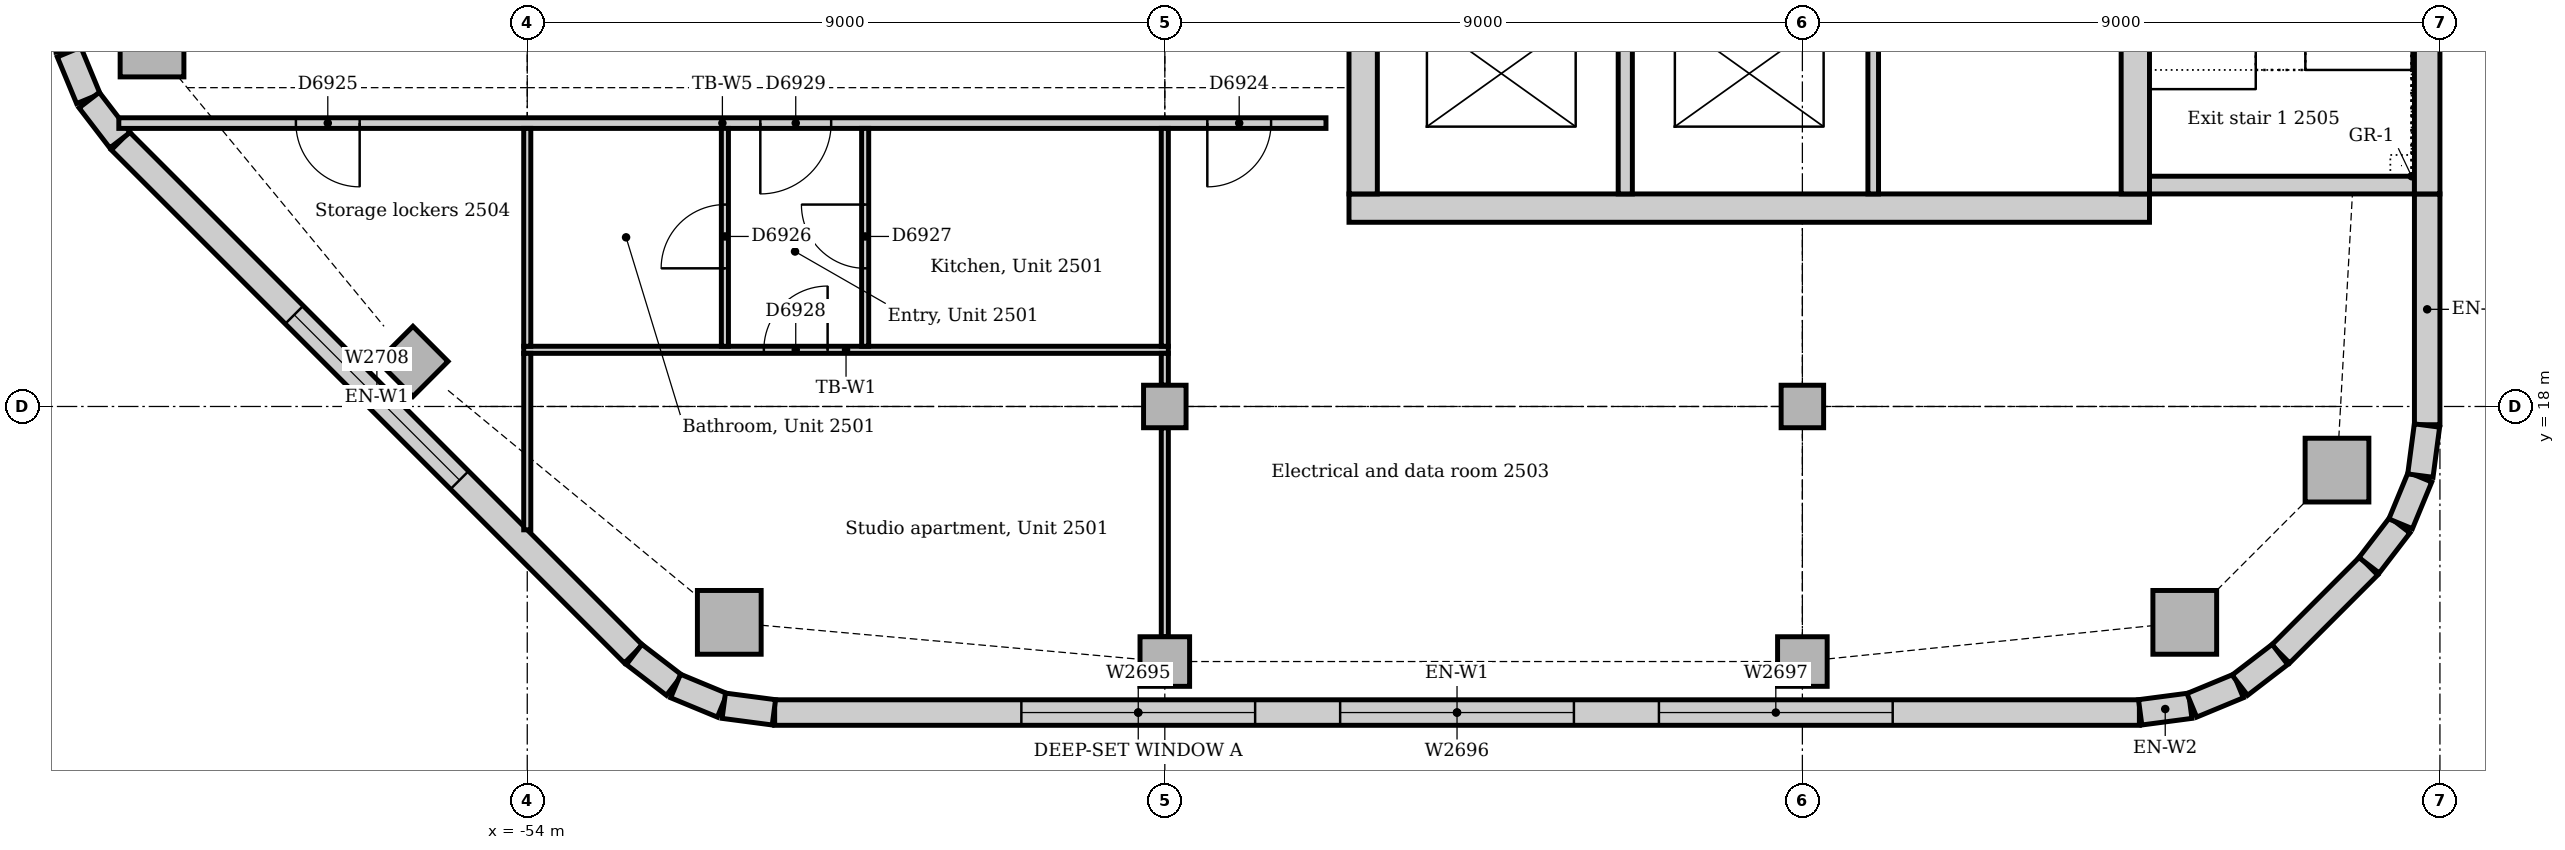
"""IFC4 building model, lengths in metres.
Left out: names, types, materials, properties, quantities, classifications, styles, units other than length and angle.
Written with IfcOpenShell. Run it as: python <this file> out.ifc"""

import sys

from ifc_helpers import new_model, si_unit, direction, frame, frame_2d, origin, origin_2d, place, context, subcontext, project, spatial, rectangle, extrude, element, fill, save


model = new_model("IFC4")
c1 = context("Model", 3, precision=1e-05, world=origin(), true_north=direction((0.0, 1.0)))
c2 = subcontext(c1, "Body", "Model", "MODEL_VIEW")
j1 = project(units=[si_unit("LENGTHUNIT", "METRE"), si_unit("PLANEANGLEUNIT", "RADIAN")], contexts=[c1])
p1 = place(None, origin())
s1 = spatial("IfcSite", under=j1, at=p1, CompositionType="ELEMENT")
p2 = place(p1, origin())
s2 = spatial("IfcBuilding", under=s1, at=p2, CompositionType="ELEMENT")
p3 = place(p2, frame((0.0, 0.0, 108.0)))
s3 = spatial("IfcBuildingStorey", under=s2, at=p3, CompositionType="ELEMENT", Elevation=108.0)
p4 = place(p3, frame((-42.4, 20.8, 0.0), z_axis=(0.0, 0.0, 1.0), x_axis=(1.0, 0.0, 0.0)))
e1 = element("IfcWall", 1, at=p4, inside=s3, PredefinedType="SOLIDWALL", context=c2, shape_type="SweptSolid", body=[
    extrude(rectangle(XDim=11.3, YDim=0.4, at=frame_2d((5.65, 0.0))), origin(), (0.0, 0.0, 1.0), 4.0),
])
p5 = place(p3, frame((-31.3, 21.0, 0.0), z_axis=(0.0, 0.0, 1.0), x_axis=(0.0, 1.0, 0.0)))
e2 = element("IfcWall", 2, at=p5, inside=s3, PredefinedType="SOLIDWALL", context=c2, shape_type="SweptSolid", body=[
    extrude(rectangle(XDim=9.5, YDim=0.4, at=frame_2d((4.75, 0.0))), origin(), (0.0, 0.0, 1.0), 4.0),
])
p6 = place(p5, frame((5.25, 0.0, 0.0)))
e3 = element("IfcOpeningElement", 3, at=p6, cuts=e2, PredefinedType="OPENING", context=c2, shape_type="SweptSolid", body=[
    extrude(rectangle(XDim=1.0, YDim=2.1, at=frame_2d((0.5, 1.05))), frame((0.0, 0.21, 0.0), z_axis=(0.0, -1.0, 0.0), x_axis=(1.0, 0.0, 0.0)), (0.0, 0.0, 1.0), 0.42),
])
p7 = place(p3, frame((-42.2, 30.5, 0.0), z_axis=(0.0, 0.0, 1.0), x_axis=(0.0, -1.0, 0.0)))
e4 = element("IfcWall", 4, at=p7, inside=s3, PredefinedType="SOLIDWALL", context=c2, shape_type="SweptSolid", body=[
    extrude(rectangle(XDim=9.5, YDim=0.4, at=frame_2d((4.75, 0.0))), origin(), (0.0, 0.0, 1.0), 4.0),
])
p8 = place(p7, frame((3.85, 0.0, 0.0)))
e5 = element("IfcOpeningElement", 5, at=p8, cuts=e4, PredefinedType="OPENING", context=c2, shape_type="SweptSolid", body=[
    extrude(rectangle(XDim=1.8, YDim=2.1, at=frame_2d((0.9, 1.05))), frame((0.0, 0.21, 0.0), z_axis=(0.0, -1.0, 0.0), x_axis=(1.0, 0.0, 0.0)), (0.0, 0.0, 1.0), 0.42),
])
p9 = place(p3, frame((-31.1, 21.125, 0.0), z_axis=(0.0, 0.0, 1.0), x_axis=(1.0, 0.0, 0.0)))
e6 = element("IfcWall", 6, at=p9, inside=s3, PredefinedType="SOLIDWALL", context=c2, shape_type="SweptSolid", body=[
    extrude(rectangle(XDim=3.74, YDim=0.25, at=frame_2d((1.87, 0.0))), origin(), (0.0, 0.0, 1.0), 4.0),
])
for number, where, z_axis, x_axis in (
    (7, (-51.148, 14.953, 0.0), (0.0, 0.0, 1.0), (1.0, 0.0, 0.0)),
    (8, (-30.602, 14.953, 0.0), (0.0, 0.0, 1.0), (1.0, 0.0, 0.0)),
    (9, (-28.453, 17.102, 0.0), (0.0, 0.0, 1.0), (1.0, 0.0, 0.0)),
    (10, (-59.297, 23.102, 0.0), (0.0, 0.0, 1.0), (1.0, 0.0, 0.0)),
):
    element("IfcColumn", number, at=place(p3, frame(where, z_axis=z_axis, x_axis=x_axis)), inside=s3, PredefinedType="COLUMN", context=c2, shape_type="SweptSolid", body=[
        extrude(rectangle(XDim=0.9, YDim=0.9, at=origin_2d()), origin(), (0.0, 0.0, 1.0), 3.85),
    ])
for number, where, z_axis, x_axis in (
    (11, (-45.0, 14.4, 0.0), (0.0, 0.0, 1.0), (1.0, 0.0, 0.0)),
    (12, (-36.0, 14.4, 0.0), (0.0, 0.0, 1.0), (1.0, 0.0, 0.0)),
    (13, (-55.614, 18.636, 0.0), (0.0, 0.0, 1.0), (0.707, 0.707, 0.0)),
):
    element("IfcColumn", number, at=place(p3, frame(where, z_axis=z_axis, x_axis=x_axis)), inside=s3, PredefinedType="COLUMN", context=c2, shape_type="SweptSolid", body=[
        extrude(rectangle(XDim=0.7, YDim=0.7, at=origin_2d()), origin(), (0.0, 0.0, 1.0), 3.85),
    ])
for number, where, z_axis, x_axis in (
    (14, (-45.0, 18.0, 0.0), (0.0, 0.0, 1.0), (1.0, 0.0, 0.0)),
    (15, (-36.0, 18.0, 0.0), (0.0, 0.0, 1.0), (1.0, 0.0, 0.0)),
):
    element("IfcColumn", number, at=place(p3, frame(where, z_axis=z_axis, x_axis=x_axis)), inside=s3, PredefinedType="COLUMN", context=c2, shape_type="SweptSolid", body=[
        extrude(rectangle(XDim=0.6, YDim=0.6, at=origin_2d()), origin(), (0.0, 0.0, 1.0), 3.85),
    ])
p10 = place(p3, frame((-50.507, 13.68, 0.0), z_axis=(0.0, 0.0, 1.0), x_axis=(1.0, 0.0, 0.0)))
e16 = element("IfcWall", 16, at=p10, inside=s3, PredefinedType="STANDARD", context=c2, shape_type="SweptSolid", body=[
    extrude(rectangle(XDim=19.265, YDim=0.36, at=frame_2d((9.632, 0.0))), origin(), (0.0, 0.0, 1.0), 3.85),
])
p11 = place(p10, frame((3.482, 0.0, 0.9)))
e17 = element("IfcOpeningElement", 17, at=p11, cuts=e16, PredefinedType="OPENING", context=c2, shape_type="SweptSolid", body=[
    extrude(rectangle(XDim=3.3, YDim=1.6, at=frame_2d((1.65, 0.8))), frame((0.0, 0.19, 0.0), z_axis=(0.0, -1.0, 0.0), x_axis=(1.0, 0.0, 0.0)), (0.0, 0.0, 1.0), 0.38),
])
p12 = place(p10, frame((7.982, 0.0, 0.9)))
e18 = element("IfcOpeningElement", 18, at=p12, cuts=e16, PredefinedType="OPENING", context=c2, shape_type="SweptSolid", body=[
    extrude(rectangle(XDim=3.3, YDim=1.6, at=frame_2d((1.65, 0.8))), frame((0.0, 0.19, 0.0), z_axis=(0.0, -1.0, 0.0), x_axis=(1.0, 0.0, 0.0)), (0.0, 0.0, 1.0), 0.38),
])
p13 = place(p10, frame((12.482, 0.0, 0.9)))
e19 = element("IfcOpeningElement", 19, at=p13, cuts=e16, PredefinedType="OPENING", context=c2, shape_type="SweptSolid", body=[
    extrude(rectangle(XDim=3.3, YDim=1.6, at=frame_2d((1.65, 0.8))), frame((0.0, 0.19, 0.0), z_axis=(0.0, -1.0, 0.0), x_axis=(1.0, 0.0, 0.0)), (0.0, 0.0, 1.0), 0.38),
])
p14 = place(p3, frame((-29.249, 14.506, 0.0), z_axis=(0.0, 0.0, 1.0), x_axis=(0.707106781187, 0.707106781187, 0.0)))
e20 = element("IfcWall", 20, at=p14, inside=s3, PredefinedType="STANDARD", context=c2, shape_type="SweptSolid", body=[
    extrude(rectangle(XDim=1.757, YDim=0.36, at=frame_2d((0.879, 0.0))), origin(), (0.0, 0.0, 1.0), 3.85),
])
p15 = place(p3, frame((-27.18, 17.743, 0.0), z_axis=(0.0, 0.0, 1.0), x_axis=(0.0, 1.0, 0.0)))
e21 = element("IfcWall", 21, at=p15, inside=s3, PredefinedType="STANDARD", context=c2, shape_type="SweptSolid", body=[
    extrude(rectangle(XDim=3.257, YDim=0.36, at=frame_2d((1.629, 0.0))), origin(), (0.0, 0.0, 1.0), 3.85),
])
p16 = place(p3, frame((-27.18, 21.0, 0.0), z_axis=(0.0, 0.0, 1.0), x_axis=(0.0, 1.0, 0.0)))
e22 = element("IfcWall", 22, at=p16, inside=s3, PredefinedType="STANDARD", context=c2, shape_type="SweptSolid", body=[
    extrude(rectangle(XDim=6.75, YDim=0.36, at=frame_2d((3.375, 0.0))), origin(), (0.0, 0.0, 1.0), 3.85),
])
p17 = place(p3, frame((-59.744, 21.749, 0.0), z_axis=(0.0, 0.0, 1.0), x_axis=(0.707106781187, -0.707106781187, 0.0)))
e23 = element("IfcWall", 23, at=p17, inside=s3, PredefinedType="STANDARD", context=c2, shape_type="SweptSolid", body=[
    extrude(rectangle(XDim=10.243, YDim=0.36, at=frame_2d((5.121, 0.0))), origin(), (0.0, 0.0, 1.0), 3.85),
])
p18 = place(p17, frame((3.471, 0.0, 0.9)))
e24 = element("IfcOpeningElement", 24, at=p18, cuts=e23, PredefinedType="OPENING", context=c2, shape_type="SweptSolid", body=[
    extrude(rectangle(XDim=3.3, YDim=1.6, at=frame_2d((1.65, 0.8))), frame((0.0, 0.19, 0.0), z_axis=(0.0, -1.0, 0.0), x_axis=(1.0, 0.0, 0.0)), (0.0, 0.0, 1.0), 0.38),
])
for number, where, z_axis, x_axis in (
    (25, (-31.231, 13.683, 0.0), (0.0, 0.0, 1.0), (0.991, 0.131, 0.0)),
    (26, (-30.503, 13.782, 0.0), (0.0, 0.0, 1.0), (0.924, 0.383, 0.0)),
):
    element("IfcWall", number, at=place(p3, frame(where, z_axis=z_axis, x_axis=x_axis)), inside=s3, PredefinedType="STANDARD", context=c2, shape_type="SweptSolid", body=[
        extrude(rectangle(XDim=0.713, YDim=0.36, at=frame_2d((0.356, 0.0))), origin(), (0.0, 0.0, 1.0), 3.85),
    ])
for number, where, z_axis, x_axis in (
    (27, (-29.825, 14.066, 0.0), (0.0, 0.0, 1.0), (0.793, 0.609, 0.0)),
    (28, (-28.0, 15.759, 0.0), (0.0, 0.0, 1.0), (0.609, 0.793, 0.0)),
):
    element("IfcWall", number, at=place(p3, frame(where, z_axis=z_axis, x_axis=x_axis)), inside=s3, PredefinedType="STANDARD", context=c2, shape_type="SweptSolid", body=[
        extrude(rectangle(XDim=0.713, YDim=0.36, at=frame_2d((0.357, 0.0))), origin(), (0.0, 0.0, 1.0), 3.85),
    ])
for number, where, z_axis, x_axis in (
    (29, (-27.555, 16.344, 0.0), (0.0, 0.0, 1.0), (0.383, 0.924, 0.0)),
    (30, (-27.276, 17.024, 0.0), (0.0, 0.0, 1.0), (0.131, 0.991, 0.0)),
    (31, (-60.468, 23.003, 0.0), (0.0, 0.0, 1.0), (0.383, -0.924, 0.0)),
):
    element("IfcWall", number, at=place(p3, frame(where, z_axis=z_axis, x_axis=x_axis)), inside=s3, PredefinedType="STANDARD", context=c2, shape_type="SweptSolid", body=[
        extrude(rectangle(XDim=0.713, YDim=0.36, at=frame_2d((0.356, 0.0))), origin(), (0.0, 0.0, 1.0), 3.85),
    ])
for number, where, z_axis, x_axis in (
    (32, (-60.184, 22.325, 0.0), (0.0, 0.0, 1.0), (0.609, -0.793, 0.0)),
    (33, (-52.491, 14.5, 0.0), (0.0, 0.0, 1.0), (0.793, -0.609, 0.0)),
):
    element("IfcWall", number, at=place(p3, frame(where, z_axis=z_axis, x_axis=x_axis)), inside=s3, PredefinedType="STANDARD", context=c2, shape_type="SweptSolid", body=[
        extrude(rectangle(XDim=0.713, YDim=0.36, at=frame_2d((0.357, 0.0))), origin(), (0.0, 0.0, 1.0), 3.85),
    ])
for number, where, z_axis, x_axis in (
    (34, (-51.906, 14.055, 0.0), (0.0, 0.0, 1.0), (0.924, -0.383, 0.0)),
    (35, (-51.226, 13.776, 0.0), (0.0, 0.0, 1.0), (0.991, -0.131, 0.0)),
):
    element("IfcWall", number, at=place(p3, frame(where, z_axis=z_axis, x_axis=x_axis)), inside=s3, PredefinedType="STANDARD", context=c2, shape_type="SweptSolid", body=[
        extrude(rectangle(XDim=0.713, YDim=0.36, at=frame_2d((0.356, 0.0))), origin(), (0.0, 0.0, 1.0), 3.85),
    ])
p19 = place(p3, frame((-38.5, 21.0, 0.0), z_axis=(0.0, 0.0, 1.0), x_axis=(0.0, 1.0, 0.0)))
e36 = element("IfcWall", 36, at=p19, inside=s3, PredefinedType="SOLIDWALL", context=c2, shape_type="SweptSolid", body=[
    extrude(rectangle(XDim=3.1, YDim=0.2, at=frame_2d((1.55, 0.0))), origin(), (0.0, 0.0, 1.0), 4.0),
])
p20 = place(p3, frame((-35.0, 21.0, 0.0), z_axis=(0.0, 0.0, 1.0), x_axis=(0.0, 1.0, 0.0)))
e37 = element("IfcWall", 37, at=p20, inside=s3, PredefinedType="SOLIDWALL", context=c2, shape_type="SweptSolid", body=[
    extrude(rectangle(XDim=2.9, YDim=0.15, at=frame_2d((1.45, 0.0))), origin(), (0.0, 0.0, 1.0), 4.0),
])
p21 = place(p3, frame((-59.766, 22.0, 0.0), z_axis=(0.0, 0.0, 1.0), x_axis=(1.0, 0.0, 0.0)))
e38 = element("IfcWall", 38, at=p21, inside=s3, PredefinedType="PARTITIONING", context=c2, shape_type="SweptSolid", body=[
    extrude(rectangle(XDim=17.041, YDim=0.15, at=frame_2d((8.52, 0.0))), origin(), (0.0, 0.0, 1.0), 3.85),
])
p22 = place(p21, frame((15.366, 0.0, 0.0)))
e39 = element("IfcOpeningElement", 39, at=p22, cuts=e38, PredefinedType="OPENING", context=c2, shape_type="SweptSolid", body=[
    extrude(rectangle(XDim=0.9, YDim=2.1, at=frame_2d((0.45, 1.05))), frame((0.0, 0.085, 0.0), z_axis=(0.0, -1.0, 0.0), x_axis=(1.0, 0.0, 0.0)), (0.0, 0.0, 1.0), 0.17),
])
p23 = place(p21, frame((2.5, 0.0, 0.0)))
e40 = element("IfcOpeningElement", 40, at=p23, cuts=e38, PredefinedType="OPENING", context=c2, shape_type="SweptSolid", body=[
    extrude(rectangle(XDim=0.9, YDim=2.1, at=frame_2d((0.45, 1.05))), frame((0.0, 0.085, 0.0), z_axis=(0.0, -1.0, 0.0), x_axis=(1.0, 0.0, 0.0)), (0.0, 0.0, 1.0), 0.17),
])
p24 = place(p21, frame((9.056, 0.0, 0.0)))
e41 = element("IfcOpeningElement", 41, at=p24, cuts=e38, PredefinedType="OPENING", context=c2, shape_type="SweptSolid", body=[
    extrude(rectangle(XDim=1.0, YDim=2.1, at=frame_2d((0.5, 1.05))), frame((0.0, 0.085, 0.0), z_axis=(0.0, -1.0, 0.0), x_axis=(1.0, 0.0, 0.0)), (0.0, 0.0, 1.0), 0.17),
])
p25 = place(p3, frame((-54.05, 18.8, 0.0), z_axis=(0.0, 0.0, 1.0), x_axis=(1.0, 0.0, 0.0)))
e42 = element("IfcWall", 42, at=p25, inside=s3, PredefinedType="PARTITIONING", context=c2, shape_type="SweptSolid", body=[
    extrude(rectangle(XDim=9.1, YDim=0.1, at=frame_2d((4.55, 0.0))), origin(), (0.0, 0.0, 1.0), 3.85),
])
p26 = place(p25, frame((3.39, 0.0, 0.0)))
e43 = element("IfcOpeningElement", 43, at=p26, cuts=e42, PredefinedType="OPENING", context=c2, shape_type="SweptSolid", body=[
    extrude(rectangle(XDim=0.9, YDim=2.1, at=frame_2d((0.45, 1.05))), frame((0.0, 0.06, 0.0), z_axis=(0.0, -1.0, 0.0), x_axis=(1.0, 0.0, 0.0)), (0.0, 0.0, 1.0), 0.12),
])
p27 = place(p3, frame((-45.0, 18.85, 0.0), z_axis=(0.0, 0.0, 1.0), x_axis=(0.0, 1.0, 0.0)))
e44 = element("IfcWall", 44, at=p27, inside=s3, PredefinedType="PARTITIONING", context=c2, shape_type="SweptSolid", body=[
    extrude(rectangle(XDim=3.075, YDim=0.1, at=frame_2d((1.538, 0.0))), origin(), (0.0, 0.0, 1.0), 3.362),
])
p28 = place(p3, frame((-45.0, 18.3, 0.0), z_axis=(0.0, 0.0, 1.0), x_axis=(0.0, 1.0, 0.0)))
e45 = element("IfcWall", 45, at=p28, inside=s3, PredefinedType="PARTITIONING", context=c2, shape_type="SweptSolid", body=[
    extrude(rectangle(XDim=0.45, YDim=0.1, at=frame_2d((0.225, 0.0))), origin(), (0.0, 0.0, 1.0), 3.85),
])
p29 = place(p3, frame((-45.0, 14.75, 0.0), z_axis=(0.0, 0.0, 1.0), x_axis=(0.0, 1.0, 0.0)))
e46 = element("IfcWall", 46, at=p29, inside=s3, PredefinedType="PARTITIONING", context=c2, shape_type="SweptSolid", body=[
    extrude(rectangle(XDim=2.95, YDim=0.1, at=frame_2d((1.475, 0.0))), origin(), (0.0, 0.0, 1.0), 3.652),
])
p30 = place(p3, frame((-54.0, 18.85, 0.0), z_axis=(0.0, 0.0, 1.0), x_axis=(0.0, 1.0, 0.0)))
e47 = element("IfcWall", 47, at=p30, inside=s3, PredefinedType="PARTITIONING", context=c2, shape_type="SweptSolid", body=[
    extrude(rectangle(XDim=3.075, YDim=0.1, at=frame_2d((1.538, 0.0))), origin(), (0.0, 0.0, 1.0), 3.362),
])
p31 = place(p3, frame((-54.0, 16.259, 0.0), z_axis=(0.0, 0.0, 1.0), x_axis=(0.0, 1.0, 0.0)))
e48 = element("IfcWall", 48, at=p31, inside=s3, PredefinedType="PARTITIONING", context=c2, shape_type="SweptSolid", body=[
    extrude(rectangle(XDim=2.491, YDim=0.1, at=frame_2d((1.245, 0.0))), origin(), (0.0, 0.0, 1.0), 3.362),
])
p32 = place(p3, frame((-51.21, 18.85, 0.0), z_axis=(0.0, 0.0, 1.0), x_axis=(0.0, 1.0, 0.0)))
e49 = element("IfcWall", 49, at=p32, inside=s3, PredefinedType="PARTITIONING", context=c2, shape_type="SweptSolid", body=[
    extrude(rectangle(XDim=3.075, YDim=0.1, at=frame_2d((1.538, 0.0))), origin(), (0.0, 0.0, 1.0), 3.85),
])
p33 = place(p32, frame((1.1, 0.0, 0.0)))
e50 = element("IfcOpeningElement", 50, at=p33, cuts=e49, PredefinedType="OPENING", context=c2, shape_type="SweptSolid", body=[
    extrude(rectangle(XDim=0.9, YDim=2.1, at=frame_2d((0.45, 1.05))), frame((0.0, 0.06, 0.0), z_axis=(0.0, -1.0, 0.0), x_axis=(1.0, 0.0, 0.0)), (0.0, 0.0, 1.0), 0.12),
])
p34 = place(p3, frame((-49.23, 18.85, 0.0), z_axis=(0.0, 0.0, 1.0), x_axis=(0.0, 1.0, 0.0)))
e51 = element("IfcWall", 51, at=p34, inside=s3, PredefinedType="PARTITIONING", context=c2, shape_type="SweptSolid", body=[
    extrude(rectangle(XDim=3.075, YDim=0.1, at=frame_2d((1.538, 0.0))), origin(), (0.0, 0.0, 1.0), 3.85),
])
p35 = place(p34, frame((1.1, 0.0, 0.0)))
e52 = element("IfcOpeningElement", 52, at=p35, cuts=e51, PredefinedType="OPENING", context=c2, shape_type="SweptSolid", body=[
    extrude(rectangle(XDim=0.9, YDim=2.1, at=frame_2d((0.45, 1.05))), frame((0.0, 0.06, 0.0), z_axis=(0.0, -1.0, 0.0), x_axis=(1.0, 0.0, 0.0)), (0.0, 0.0, 1.0), 0.12),
])
p36 = place(p11, origin())
e53 = element("IfcWindow", 53, at=p36, inside=s3, PartitioningType="SINGLE_PANEL", PredefinedType="WINDOW", context=c2, shape_type="SweptSolid", body=[
    extrude(rectangle(XDim=3.3, YDim=1.6, at=frame_2d((1.65, 0.8))), frame((0.0, 0.13, 0.0), z_axis=(0.0, -1.0, 0.0), x_axis=(1.0, 0.0, 0.0)), (0.0, 0.0, 1.0), 0.06),
])
fill(e17, e53)
p37 = place(p12, origin())
e54 = element("IfcWindow", 54, at=p37, inside=s3, PartitioningType="SINGLE_PANEL", PredefinedType="WINDOW", context=c2, shape_type="SweptSolid", body=[
    extrude(rectangle(XDim=3.3, YDim=1.6, at=frame_2d((1.65, 0.8))), frame((0.0, 0.13, 0.0), z_axis=(0.0, -1.0, 0.0), x_axis=(1.0, 0.0, 0.0)), (0.0, 0.0, 1.0), 0.06),
])
fill(e18, e54)
p38 = place(p13, origin())
e55 = element("IfcWindow", 55, at=p38, inside=s3, PartitioningType="SINGLE_PANEL", PredefinedType="WINDOW", context=c2, shape_type="SweptSolid", body=[
    extrude(rectangle(XDim=3.3, YDim=1.6, at=frame_2d((1.65, 0.8))), frame((0.0, 0.13, 0.0), z_axis=(0.0, -1.0, 0.0), x_axis=(1.0, 0.0, 0.0)), (0.0, 0.0, 1.0), 0.06),
])
fill(e19, e55)
p39 = place(p18, origin())
e56 = element("IfcWindow", 56, at=p39, inside=s3, PartitioningType="SINGLE_PANEL", PredefinedType="WINDOW", context=c2, shape_type="SweptSolid", body=[
    extrude(rectangle(XDim=3.3, YDim=1.6, at=frame_2d((1.65, 0.8))), frame((0.0, 0.13, 0.0), z_axis=(0.0, -1.0, 0.0), x_axis=(1.0, 0.0, 0.0)), (0.0, 0.0, 1.0), 0.06),
])
fill(e24, e56)
p40 = place(p22, frame((0.9, 0.0, 0.0), z_axis=(0.0, 0.0, 1.0), x_axis=(-1.0, 0.0, 0.0)))
e57 = element("IfcDoor", 57, at=p40, inside=s3, OperationType="SINGLE_SWING_RIGHT", PredefinedType="DOOR", context=c2, shape_type="SweptSolid", body=[
    extrude(rectangle(XDim=0.9, YDim=2.1, at=frame_2d((0.45, 1.05))), frame((0.0, 0.025, 0.0), z_axis=(0.0, -1.0, 0.0), x_axis=(1.0, 0.0, 0.0)), (0.0, 0.0, 1.0), 0.05),
])
fill(e39, e57)
p41 = place(p23, frame((0.9, 0.0, 0.0), z_axis=(0.0, 0.0, 1.0), x_axis=(-1.0, 0.0, 0.0)))
e58 = element("IfcDoor", 58, at=p41, inside=s3, OperationType="SINGLE_SWING_LEFT", PredefinedType="DOOR", context=c2, shape_type="SweptSolid", body=[
    extrude(rectangle(XDim=0.9, YDim=2.1, at=frame_2d((0.45, 1.05))), frame((0.0, 0.025, 0.0), z_axis=(0.0, -1.0, 0.0), x_axis=(1.0, 0.0, 0.0)), (0.0, 0.0, 1.0), 0.05),
])
fill(e40, e58)
p42 = place(p33, origin())
e59 = element("IfcDoor", 59, at=p42, inside=s3, OperationType="SINGLE_SWING_LEFT", PredefinedType="DOOR", context=c2, shape_type="SweptSolid", body=[
    extrude(rectangle(XDim=0.9, YDim=2.1, at=frame_2d((0.45, 1.05))), frame((0.0, 0.025, 0.0), z_axis=(0.0, -1.0, 0.0), x_axis=(1.0, 0.0, 0.0)), (0.0, 0.0, 1.0), 0.05),
])
fill(e50, e59)
p43 = place(p35, origin())
e60 = element("IfcDoor", 60, at=p43, inside=s3, OperationType="SINGLE_SWING_RIGHT", PredefinedType="DOOR", context=c2, shape_type="SweptSolid", body=[
    extrude(rectangle(XDim=0.9, YDim=2.1, at=frame_2d((0.45, 1.05))), frame((0.0, 0.025, 0.0), z_axis=(0.0, -1.0, 0.0), x_axis=(1.0, 0.0, 0.0)), (0.0, 0.0, 1.0), 0.05),
])
fill(e52, e60)
p44 = place(p26, origin())
e61 = element("IfcDoor", 61, at=p44, inside=s3, OperationType="SINGLE_SWING_RIGHT", PredefinedType="DOOR", context=c2, shape_type="SweptSolid", body=[
    extrude(rectangle(XDim=0.9, YDim=2.1, at=frame_2d((0.45, 1.05))), frame((0.0, 0.025, 0.0), z_axis=(0.0, -1.0, 0.0), x_axis=(1.0, 0.0, 0.0)), (0.0, 0.0, 1.0), 0.05),
])
fill(e43, e61)
p45 = place(p24, frame((1.0, 0.0, 0.0), z_axis=(0.0, 0.0, 1.0), x_axis=(-1.0, 0.0, 0.0)))
e62 = element("IfcDoor", 62, at=p45, inside=s3, OperationType="SINGLE_SWING_RIGHT", PredefinedType="DOOR", context=c2, shape_type="SweptSolid", body=[
    extrude(rectangle(XDim=1.0, YDim=2.1, at=frame_2d((0.5, 1.05))), frame((0.0, 0.025, 0.0), z_axis=(0.0, -1.0, 0.0), x_axis=(1.0, 0.0, 0.0)), (0.0, 0.0, 1.0), 0.05),
])
fill(e41, e62)
save(model, sys.argv[1])
